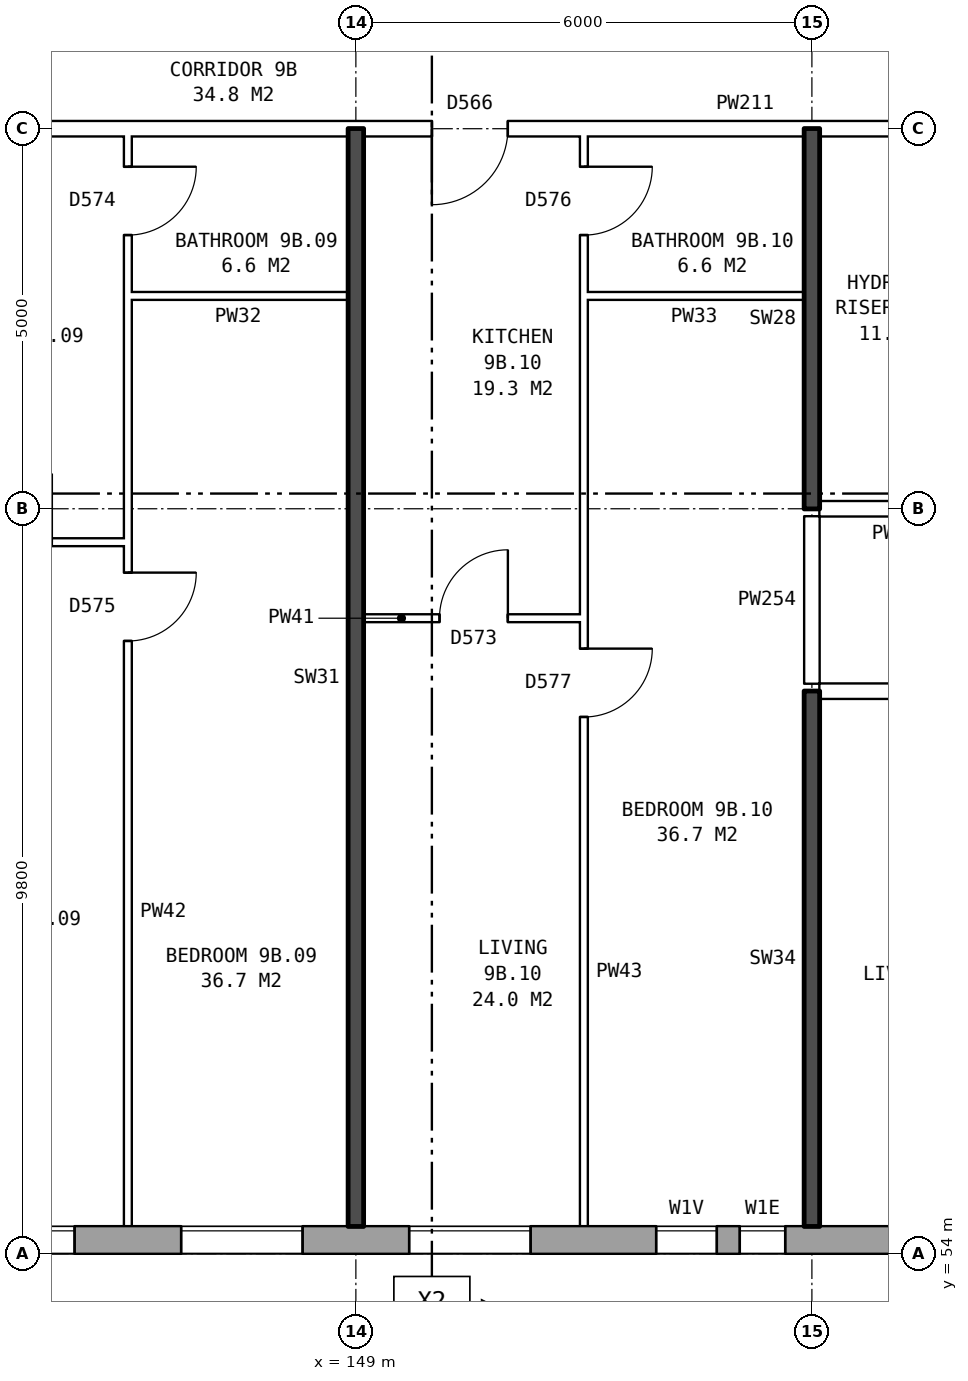
"""IFC4 building model, lengths in metres.
Left out: names, types, materials, properties, quantities, classifications, styles, units other than length and angle.
Written with IfcOpenShell. Run it as: python <this file> out.ifc"""

import sys

from ifc_helpers import new_model, si_unit, direction, frame, frame_2d, origin, place, context, subcontext, project, spatial, rectangle, extrude, element, fill, save


model = new_model("IFC4")
c1 = context("Model", 3, precision=1e-05, world=origin(), true_north=direction((0.0, 1.0)))
c2 = subcontext(c1, "Body", "Model", "MODEL_VIEW")
j1 = project(units=[si_unit("LENGTHUNIT", "METRE"), si_unit("PLANEANGLEUNIT", "RADIAN")], contexts=[c1])
p1 = place(None, origin())
s1 = spatial("IfcSite", under=j1, at=p1, CompositionType="ELEMENT")
p2 = place(p1, origin())
s2 = spatial("IfcBuilding", under=s1, at=p2, CompositionType="ELEMENT")
p3 = place(p2, frame((0.0, 0.0, 35.0)))
s3 = spatial("IfcBuildingStorey", under=s2, at=p3, CompositionType="ELEMENT", Elevation=35.0)
p4 = place(p3, frame((134.075, 54.18, 0.0), z_axis=(0.0, 0.0, 1.0), x_axis=(1.0, 0.0, 0.0)))
e1 = element("IfcWall", 1, at=p4, inside=s3, PredefinedType="STANDARD", context=c2, shape_type="SweptSolid", body=[
    extrude(rectangle(XDim=40.601, YDim=0.36, at=frame_2d((20.3, 0.0))), origin(), (0.0, 0.0, 1.0), 2.85),
])
p5 = place(p4, frame((0.625, 0.0, 0.8)))
e2 = element("IfcOpeningElement", 2, at=p5, cuts=e1, PredefinedType="OPENING", context=c2, shape_type="SweptSolid", body=[
    extrude(rectangle(XDim=1.6, YDim=1.8, at=frame_2d((0.8, 0.9))), frame((0.0, 0.19, 0.0), z_axis=(0.0, -1.0, 0.0), x_axis=(1.0, 0.0, 0.0)), (0.0, 0.0, 1.0), 0.38),
])
p6 = place(p4, frame((3.625, 0.0, 0.8)))
e3 = element("IfcOpeningElement", 3, at=p6, cuts=e1, PredefinedType="OPENING", context=c2, shape_type="SweptSolid", body=[
    extrude(rectangle(XDim=1.6, YDim=1.8, at=frame_2d((0.8, 0.9))), frame((0.0, 0.19, 0.0), z_axis=(0.0, -1.0, 0.0), x_axis=(1.0, 0.0, 0.0)), (0.0, 0.0, 1.0), 0.38),
])
p7 = place(p4, frame((6.625, 0.0, 0.8)))
e4 = element("IfcOpeningElement", 4, at=p7, cuts=e1, PredefinedType="OPENING", context=c2, shape_type="SweptSolid", body=[
    extrude(rectangle(XDim=1.6, YDim=1.8, at=frame_2d((0.8, 0.9))), frame((0.0, 0.19, 0.0), z_axis=(0.0, -1.0, 0.0), x_axis=(1.0, 0.0, 0.0)), (0.0, 0.0, 1.0), 0.38),
])
p8 = place(p4, frame((9.625, 0.0, 0.8)))
e5 = element("IfcOpeningElement", 5, at=p8, cuts=e1, PredefinedType="OPENING", context=c2, shape_type="SweptSolid", body=[
    extrude(rectangle(XDim=1.6, YDim=1.8, at=frame_2d((0.8, 0.9))), frame((0.0, 0.19, 0.0), z_axis=(0.0, -1.0, 0.0), x_axis=(1.0, 0.0, 0.0)), (0.0, 0.0, 1.0), 0.38),
])
p9 = place(p4, frame((12.625, 0.0, 0.8)))
e6 = element("IfcOpeningElement", 6, at=p9, cuts=e1, PredefinedType="OPENING", context=c2, shape_type="SweptSolid", body=[
    extrude(rectangle(XDim=1.6, YDim=1.8, at=frame_2d((0.8, 0.9))), frame((0.0, 0.19, 0.0), z_axis=(0.0, -1.0, 0.0), x_axis=(1.0, 0.0, 0.0)), (0.0, 0.0, 1.0), 0.38),
])
p10 = place(p4, frame((15.625, 0.0, 0.8)))
e7 = element("IfcOpeningElement", 7, at=p10, cuts=e1, PredefinedType="OPENING", context=c2, shape_type="SweptSolid", body=[
    extrude(rectangle(XDim=1.6, YDim=1.8, at=frame_2d((0.8, 0.9))), frame((0.0, 0.19, 0.0), z_axis=(0.0, -1.0, 0.0), x_axis=(1.0, 0.0, 0.0)), (0.0, 0.0, 1.0), 0.38),
])
p11 = place(p4, frame((18.875, 0.0, 0.15)))
e8 = element("IfcOpeningElement", 8, at=p11, cuts=e1, PredefinedType="OPENING", context=c2, shape_type="SweptSolid", body=[
    extrude(rectangle(XDim=0.8, YDim=0.9, at=frame_2d((0.4, 0.45))), frame((0.0, 0.19, 0.0), z_axis=(0.0, -1.0, 0.0), x_axis=(1.0, 0.0, 0.0)), (0.0, 0.0, 1.0), 0.38),
])
p12 = place(p4, frame((22.175, 0.0, 1.7)))
e9 = element("IfcOpeningElement", 9, at=p12, cuts=e1, PredefinedType="OPENING", context=c2, shape_type="SweptSolid", body=[
    extrude(rectangle(XDim=0.8, YDim=0.9, at=frame_2d((0.4, 0.45))), frame((0.0, 0.19, 0.0), z_axis=(0.0, -1.0, 0.0), x_axis=(1.0, 0.0, 0.0)), (0.0, 0.0, 1.0), 0.38),
])
p13 = place(p4, frame((24.625, 0.0, 0.8)))
e10 = element("IfcOpeningElement", 10, at=p13, cuts=e1, PredefinedType="OPENING", context=c2, shape_type="SweptSolid", body=[
    extrude(rectangle(XDim=1.6, YDim=1.8, at=frame_2d((0.8, 0.9))), frame((0.0, 0.19, 0.0), z_axis=(0.0, -1.0, 0.0), x_axis=(1.0, 0.0, 0.0)), (0.0, 0.0, 1.0), 0.38),
])
p14 = place(p4, frame((27.625, 0.0, 0.8)))
e11 = element("IfcOpeningElement", 11, at=p14, cuts=e1, PredefinedType="OPENING", context=c2, shape_type="SweptSolid", body=[
    extrude(rectangle(XDim=1.6, YDim=1.8, at=frame_2d((0.8, 0.9))), frame((0.0, 0.19, 0.0), z_axis=(0.0, -1.0, 0.0), x_axis=(1.0, 0.0, 0.0)), (0.0, 0.0, 1.0), 0.38),
])
p15 = place(p4, frame((30.625, 0.0, 0.8)))
e12 = element("IfcOpeningElement", 12, at=p15, cuts=e1, PredefinedType="OPENING", context=c2, shape_type="SweptSolid", body=[
    extrude(rectangle(XDim=1.6, YDim=1.8, at=frame_2d((0.8, 0.9))), frame((0.0, 0.19, 0.0), z_axis=(0.0, -1.0, 0.0), x_axis=(1.0, 0.0, 0.0)), (0.0, 0.0, 1.0), 0.38),
])
p16 = place(p4, frame((33.625, 0.0, 0.8)))
e13 = element("IfcOpeningElement", 13, at=p16, cuts=e1, PredefinedType="OPENING", context=c2, shape_type="SweptSolid", body=[
    extrude(rectangle(XDim=1.6, YDim=1.8, at=frame_2d((0.8, 0.9))), frame((0.0, 0.19, 0.0), z_axis=(0.0, -1.0, 0.0), x_axis=(1.0, 0.0, 0.0)), (0.0, 0.0, 1.0), 0.38),
])
p17 = place(p4, frame((36.625, 0.0, 0.8)))
e14 = element("IfcOpeningElement", 14, at=p17, cuts=e1, PredefinedType="OPENING", context=c2, shape_type="SweptSolid", body=[
    extrude(rectangle(XDim=1.6, YDim=1.8, at=frame_2d((0.8, 0.9))), frame((0.0, 0.19, 0.0), z_axis=(0.0, -1.0, 0.0), x_axis=(1.0, 0.0, 0.0)), (0.0, 0.0, 1.0), 0.38),
])
p18 = place(p4, frame((19.975, 0.0, 0.15)))
e15 = element("IfcOpeningElement", 15, at=p18, cuts=e1, PredefinedType="OPENING", context=c2, shape_type="SweptSolid", body=[
    extrude(rectangle(XDim=0.6, YDim=1.8, at=frame_2d((0.3, 0.9))), frame((0.0, 0.19, 0.0), z_axis=(0.0, -1.0, 0.0), x_axis=(1.0, 0.0, 0.0)), (0.0, 0.0, 1.0), 0.38),
])
p19 = place(p4, frame((23.325, 0.0, 0.8)))
e16 = element("IfcOpeningElement", 16, at=p19, cuts=e1, PredefinedType="OPENING", context=c2, shape_type="SweptSolid", body=[
    extrude(rectangle(XDim=1.0, YDim=1.8, at=frame_2d((0.5, 0.9))), frame((0.0, 0.19, 0.0), z_axis=(0.0, -1.0, 0.0), x_axis=(1.0, 0.0, 0.0)), (0.0, 0.0, 1.0), 0.38),
])
p20 = place(p3, frame((155.1, 61.4, 0.0), z_axis=(0.0, 0.0, 1.0), x_axis=(1.0, 0.0, 0.0)))
e17 = element("IfcWall", 17, at=p20, inside=s3, PredefinedType="PARTITIONING", context=c2, shape_type="SweptSolid", body=[
    extrude(rectangle(XDim=22.29, YDim=0.2, at=frame_2d((11.145, 0.0))), origin(), (0.0, 0.0, 1.0), 2.85),
])
p21 = place(p20, frame((2.45, 0.0, 0.0)))
e18 = element("IfcOpeningElement", 18, at=p21, cuts=e17, PredefinedType="OPENING", context=c2, shape_type="SweptSolid", body=[
    extrude(rectangle(XDim=1.0, YDim=2.1, at=frame_2d((0.5, 1.05))), frame((0.0, 0.11, 0.0), z_axis=(0.0, -1.0, 0.0), x_axis=(1.0, 0.0, 0.0)), (0.0, 0.0, 1.0), 0.22),
])
p22 = place(p20, frame((14.4, 0.0, 0.0)))
e19 = element("IfcOpeningElement", 19, at=p22, cuts=e17, PredefinedType="OPENING", context=c2, shape_type="SweptSolid", body=[
    extrude(rectangle(XDim=1.0, YDim=2.1, at=frame_2d((0.5, 1.05))), frame((0.0, 0.11, 0.0), z_axis=(0.0, -1.0, 0.0), x_axis=(1.0, 0.0, 0.0)), (0.0, 0.0, 1.0), 0.22),
])
p23 = place(p3, frame((149.1, 62.36, 0.0), z_axis=(0.0, 0.0, 1.0), x_axis=(1.0, 0.0, 0.0)))
e20 = element("IfcWall", 20, at=p23, inside=s3, PredefinedType="PARTITIONING", context=c2, shape_type="SweptSolid", body=[
    extrude(rectangle(XDim=2.9, YDim=0.1, at=frame_2d((1.45, 0.0))), origin(), (0.0, 0.0, 1.0), 2.85),
])
p24 = place(p23, frame((1.0, 0.0, 0.0)))
e21 = element("IfcOpeningElement", 21, at=p24, cuts=e20, PredefinedType="OPENING", context=c2, shape_type="SweptSolid", body=[
    extrude(rectangle(XDim=0.9, YDim=2.1, at=frame_2d((0.45, 1.05))), frame((0.0, 0.06, 0.0), z_axis=(0.0, -1.0, 0.0), x_axis=(1.0, 0.0, 0.0)), (0.0, 0.0, 1.0), 0.12),
])
p25 = place(p3, frame((143.1, 63.36, 0.0), z_axis=(0.0, 0.0, 1.0), x_axis=(1.0, 0.0, 0.0)))
e22 = element("IfcWall", 22, at=p25, inside=s3, PredefinedType="PARTITIONING", context=c2, shape_type="SweptSolid", body=[
    extrude(rectangle(XDim=2.9, YDim=0.1, at=frame_2d((1.45, 0.0))), origin(), (0.0, 0.0, 1.0), 2.85),
])
p26 = place(p25, frame((1.0, 0.0, 0.0)))
e23 = element("IfcOpeningElement", 23, at=p26, cuts=e22, PredefinedType="OPENING", context=c2, shape_type="SweptSolid", body=[
    extrude(rectangle(XDim=0.9, YDim=2.1, at=frame_2d((0.45, 1.05))), frame((0.0, 0.06, 0.0), z_axis=(0.0, -1.0, 0.0), x_axis=(1.0, 0.0, 0.0)), (0.0, 0.0, 1.0), 0.12),
])
p27 = place(p3, frame((155.1, 63.8, 0.0), z_axis=(0.0, 0.0, 1.0), x_axis=(1.0, 0.0, 0.0)))
e24 = element("IfcWall", 24, at=p27, inside=s3, PredefinedType="PARTITIONING", context=c2, shape_type="SweptSolid", body=[
    extrude(rectangle(XDim=2.14, YDim=0.2, at=frame_2d((1.07, 0.0))), origin(), (0.0, 0.0, 1.0), 2.85),
])
for number, where, z_axis, x_axis in (
    (25, (146.0, 66.6, 0.0), (0.0, 0.0, 1.0), (1.0, 0.0, 0.0)),
    (26, (152.0, 66.6, 0.0), (0.0, 0.0, 1.0), (1.0, 0.0, 0.0)),
):
    element("IfcWall", number, at=place(p3, frame(where, z_axis=z_axis, x_axis=x_axis)), inside=s3, PredefinedType="PARTITIONING", context=c2, shape_type="SweptSolid", body=[
        extrude(rectangle(XDim=2.9, YDim=0.1, at=frame_2d((1.45, 0.0))), origin(), (0.0, 0.0, 1.0), 2.85),
    ])
p28 = place(p3, frame((142.76, 68.8, 0.0), z_axis=(0.0, 0.0, 1.0), x_axis=(1.0, 0.0, 0.0)))
e27 = element("IfcWall", 27, at=p28, inside=s3, PredefinedType="PARTITIONING", context=c2, shape_type="SweptSolid", body=[
    extrude(rectangle(XDim=14.48, YDim=0.2, at=frame_2d((7.24, 0.0))), origin(), (0.0, 0.0, 1.0), 2.85),
])
p29 = place(p28, frame((1.12, 0.0, 0.0)))
e28 = element("IfcOpeningElement", 28, at=p29, cuts=e27, PredefinedType="OPENING", context=c2, shape_type="SweptSolid", body=[
    extrude(rectangle(XDim=1.0, YDim=2.1, at=frame_2d((0.5, 1.05))), frame((0.0, 0.11, 0.0), z_axis=(0.0, -1.0, 0.0), x_axis=(1.0, 0.0, 0.0)), (0.0, 0.0, 1.0), 0.22),
])
p30 = place(p28, frame((7.24, 0.0, 0.0)))
e29 = element("IfcOpeningElement", 29, at=p30, cuts=e27, PredefinedType="OPENING", context=c2, shape_type="SweptSolid", body=[
    extrude(rectangle(XDim=1.0, YDim=2.1, at=frame_2d((0.5, 1.05))), frame((0.0, 0.11, 0.0), z_axis=(0.0, -1.0, 0.0), x_axis=(1.0, 0.0, 0.0)), (0.0, 0.0, 1.0), 0.22),
])
p31 = place(p3, frame((146.0, 54.36, 0.0), z_axis=(0.0, 0.0, 1.0), x_axis=(0.0, 1.0, 0.0)))
e30 = element("IfcWall", 30, at=p31, inside=s3, PredefinedType="PARTITIONING", context=c2, shape_type="SweptSolid", body=[
    extrude(rectangle(XDim=14.34, YDim=0.1, at=frame_2d((7.17, 0.0))), origin(), (0.0, 0.0, 1.0), 2.85),
])
p32 = place(p31, frame((7.7, 0.0, 0.0)))
e31 = element("IfcOpeningElement", 31, at=p32, cuts=e30, PredefinedType="OPENING", context=c2, shape_type="SweptSolid", body=[
    extrude(rectangle(XDim=0.9, YDim=2.1, at=frame_2d((0.45, 1.05))), frame((0.0, 0.06, 0.0), z_axis=(0.0, -1.0, 0.0), x_axis=(1.0, 0.0, 0.0)), (0.0, 0.0, 1.0), 0.12),
])
p33 = place(p31, frame((13.04, 0.0, 0.0)))
e32 = element("IfcOpeningElement", 32, at=p33, cuts=e30, PredefinedType="OPENING", context=c2, shape_type="SweptSolid", body=[
    extrude(rectangle(XDim=0.9, YDim=2.1, at=frame_2d((0.45, 1.05))), frame((0.0, 0.06, 0.0), z_axis=(0.0, -1.0, 0.0), x_axis=(1.0, 0.0, 0.0)), (0.0, 0.0, 1.0), 0.12),
])
p34 = place(p3, frame((149.0, 54.36, 0.0), z_axis=(0.0, 0.0, 1.0), x_axis=(0.0, 1.0, 0.0)))
e33 = element("IfcWall", 33, at=p34, inside=s3, PredefinedType="SOLIDWALL", context=c2, shape_type="SweptSolid", body=[
    extrude(rectangle(XDim=14.44, YDim=0.2, at=frame_2d((7.22, 0.0))), origin(), (0.0, 0.0, 1.0), 2.85),
])
p35 = place(p3, frame((152.0, 54.36, 0.0), z_axis=(0.0, 0.0, 1.0), x_axis=(0.0, 1.0, 0.0)))
e34 = element("IfcWall", 34, at=p35, inside=s3, PredefinedType="PARTITIONING", context=c2, shape_type="SweptSolid", body=[
    extrude(rectangle(XDim=14.34, YDim=0.1, at=frame_2d((7.17, 0.0))), origin(), (0.0, 0.0, 1.0), 2.85),
])
p36 = place(p35, frame((6.7, 0.0, 0.0)))
e35 = element("IfcOpeningElement", 35, at=p36, cuts=e34, PredefinedType="OPENING", context=c2, shape_type="SweptSolid", body=[
    extrude(rectangle(XDim=0.9, YDim=2.1, at=frame_2d((0.45, 1.05))), frame((0.0, 0.06, 0.0), z_axis=(0.0, -1.0, 0.0), x_axis=(1.0, 0.0, 0.0)), (0.0, 0.0, 1.0), 0.12),
])
p37 = place(p35, frame((13.04, 0.0, 0.0)))
e36 = element("IfcOpeningElement", 36, at=p37, cuts=e34, PredefinedType="OPENING", context=c2, shape_type="SweptSolid", body=[
    extrude(rectangle(XDim=0.9, YDim=2.1, at=frame_2d((0.45, 1.05))), frame((0.0, 0.06, 0.0), z_axis=(0.0, -1.0, 0.0), x_axis=(1.0, 0.0, 0.0)), (0.0, 0.0, 1.0), 0.12),
])
p38 = place(p3, frame((155.0, 54.36, 0.0), z_axis=(0.0, 0.0, 1.0), x_axis=(0.0, 1.0, 0.0)))
e37 = element("IfcWall", 37, at=p38, inside=s3, PredefinedType="SOLIDWALL", context=c2, shape_type="SweptSolid", body=[
    extrude(rectangle(XDim=7.04, YDim=0.2, at=frame_2d((3.52, 0.0))), origin(), (0.0, 0.0, 1.0), 2.85),
])
p39 = place(p3, frame((155.0, 61.5, 0.0), z_axis=(0.0, 0.0, 1.0), x_axis=(0.0, 1.0, 0.0)))
e38 = element("IfcWall", 38, at=p39, inside=s3, PredefinedType="PARTITIONING", context=c2, shape_type="SweptSolid", body=[
    extrude(rectangle(XDim=2.2, YDim=0.2, at=frame_2d((1.1, 0.0))), origin(), (0.0, 0.0, 1.0), 2.85),
])
p40 = place(p3, frame((155.0, 63.8, 0.0), z_axis=(0.0, 0.0, 1.0), x_axis=(0.0, 1.0, 0.0)))
e39 = element("IfcWall", 39, at=p40, inside=s3, PredefinedType="SOLIDWALL", context=c2, shape_type="SweptSolid", body=[
    extrude(rectangle(XDim=5.0, YDim=0.2, at=frame_2d((2.5, 0.0))), origin(), (0.0, 0.0, 1.0), 2.85),
])
p41 = place(p8, origin())
e40 = element("IfcWindow", 40, at=p41, inside=s3, PartitioningType="SINGLE_PANEL", PredefinedType="WINDOW", context=c2, shape_type="SweptSolid", body=[
    extrude(rectangle(XDim=1.6, YDim=1.8, at=frame_2d((0.8, 0.9))), frame((0.0, 0.15, 0.0), z_axis=(0.0, -1.0, 0.0), x_axis=(1.0, 0.0, 0.0)), (0.0, 0.0, 1.0), 0.06),
])
fill(e5, e40)
p42 = place(p9, origin())
e41 = element("IfcWindow", 41, at=p42, inside=s3, PartitioningType="SINGLE_PANEL", PredefinedType="WINDOW", context=c2, shape_type="SweptSolid", body=[
    extrude(rectangle(XDim=1.6, YDim=1.8, at=frame_2d((0.8, 0.9))), frame((0.0, 0.15, 0.0), z_axis=(0.0, -1.0, 0.0), x_axis=(1.0, 0.0, 0.0)), (0.0, 0.0, 1.0), 0.06),
])
fill(e6, e41)
p43 = place(p10, origin())
e42 = element("IfcWindow", 42, at=p43, inside=s3, PartitioningType="SINGLE_PANEL", PredefinedType="WINDOW", context=c2, shape_type="SweptSolid", body=[
    extrude(rectangle(XDim=1.6, YDim=1.8, at=frame_2d((0.8, 0.9))), frame((0.0, 0.15, 0.0), z_axis=(0.0, -1.0, 0.0), x_axis=(1.0, 0.0, 0.0)), (0.0, 0.0, 1.0), 0.06),
])
fill(e7, e42)
p44 = place(p11, origin())
e43 = element("IfcWindow", 43, at=p44, inside=s3, PartitioningType="SINGLE_PANEL", PredefinedType="WINDOW", context=c2, shape_type="SweptSolid", body=[
    extrude(rectangle(XDim=0.8, YDim=0.9, at=frame_2d((0.4, 0.45))), frame((0.0, 0.15, 0.0), z_axis=(0.0, -1.0, 0.0), x_axis=(1.0, 0.0, 0.0)), (0.0, 0.0, 1.0), 0.06),
])
fill(e8, e43)
p45 = place(p32, frame((0.9, 0.0, 0.0), z_axis=(0.0, 0.0, 1.0), x_axis=(-1.0, 0.0, 0.0)))
e44 = element("IfcDoor", 44, at=p45, inside=s3, OperationType="SINGLE_SWING_LEFT", PredefinedType="DOOR", context=c2, shape_type="SweptSolid", body=[
    extrude(rectangle(XDim=0.9, YDim=2.1, at=frame_2d((0.45, 1.05))), frame((0.0, 0.025, 0.0), z_axis=(0.0, -1.0, 0.0), x_axis=(1.0, 0.0, 0.0)), (0.0, 0.0, 1.0), 0.05),
])
fill(e31, e44)
p46 = place(p33, frame((0.9, 0.0, 0.0), z_axis=(0.0, 0.0, 1.0), x_axis=(-1.0, 0.0, 0.0)))
e45 = element("IfcDoor", 45, at=p46, inside=s3, OperationType="SINGLE_SWING_LEFT", PredefinedType="DOOR", context=c2, shape_type="SweptSolid", body=[
    extrude(rectangle(XDim=0.9, YDim=2.1, at=frame_2d((0.45, 1.05))), frame((0.0, 0.025, 0.0), z_axis=(0.0, -1.0, 0.0), x_axis=(1.0, 0.0, 0.0)), (0.0, 0.0, 1.0), 0.05),
])
fill(e32, e45)
p47 = place(p36, frame((0.9, 0.0, 0.0), z_axis=(0.0, 0.0, 1.0), x_axis=(-1.0, 0.0, 0.0)))
e46 = element("IfcDoor", 46, at=p47, inside=s3, OperationType="SINGLE_SWING_LEFT", PredefinedType="DOOR", context=c2, shape_type="SweptSolid", body=[
    extrude(rectangle(XDim=0.9, YDim=2.1, at=frame_2d((0.45, 1.05))), frame((0.0, 0.025, 0.0), z_axis=(0.0, -1.0, 0.0), x_axis=(1.0, 0.0, 0.0)), (0.0, 0.0, 1.0), 0.05),
])
fill(e35, e46)
p48 = place(p30, frame((1.0, 0.0, 0.0), z_axis=(0.0, 0.0, 1.0), x_axis=(-1.0, 0.0, 0.0)))
e47 = element("IfcDoor", 47, at=p48, inside=s3, OperationType="SINGLE_SWING_RIGHT", PredefinedType="DOOR", context=c2, shape_type="SweptSolid", body=[
    extrude(rectangle(XDim=1.0, YDim=2.1, at=frame_2d((0.5, 1.05))), frame((0.0, 0.025, 0.0), z_axis=(0.0, -1.0, 0.0), x_axis=(1.0, 0.0, 0.0)), (0.0, 0.0, 1.0), 0.05),
])
fill(e29, e47)
p49 = place(p24, origin())
e48 = element("IfcDoor", 48, at=p49, inside=s3, OperationType="SINGLE_SWING_RIGHT", PredefinedType="DOOR", context=c2, shape_type="SweptSolid", body=[
    extrude(rectangle(XDim=0.9, YDim=2.1, at=frame_2d((0.45, 1.05))), frame((0.0, 0.025, 0.0), z_axis=(0.0, -1.0, 0.0), x_axis=(1.0, 0.0, 0.0)), (0.0, 0.0, 1.0), 0.05),
])
fill(e21, e48)
p50 = place(p37, frame((0.9, 0.0, 0.0), z_axis=(0.0, 0.0, 1.0), x_axis=(-1.0, 0.0, 0.0)))
e49 = element("IfcDoor", 49, at=p50, inside=s3, OperationType="SINGLE_SWING_LEFT", PredefinedType="DOOR", context=c2, shape_type="SweptSolid", body=[
    extrude(rectangle(XDim=0.9, YDim=2.1, at=frame_2d((0.45, 1.05))), frame((0.0, 0.025, 0.0), z_axis=(0.0, -1.0, 0.0), x_axis=(1.0, 0.0, 0.0)), (0.0, 0.0, 1.0), 0.05),
])
fill(e36, e49)
p51 = place(p18, origin())
e50 = element("IfcWindow", 50, at=p51, inside=s3, PartitioningType="SINGLE_PANEL", PredefinedType="WINDOW", context=c2, shape_type="SweptSolid", body=[
    extrude(rectangle(XDim=0.6, YDim=1.8, at=frame_2d((0.3, 0.9))), frame((0.0, 0.15, 0.0), z_axis=(0.0, -1.0, 0.0), x_axis=(1.0, 0.0, 0.0)), (0.0, 0.0, 1.0), 0.06),
])
fill(e15, e50)
save(model, sys.argv[1])
